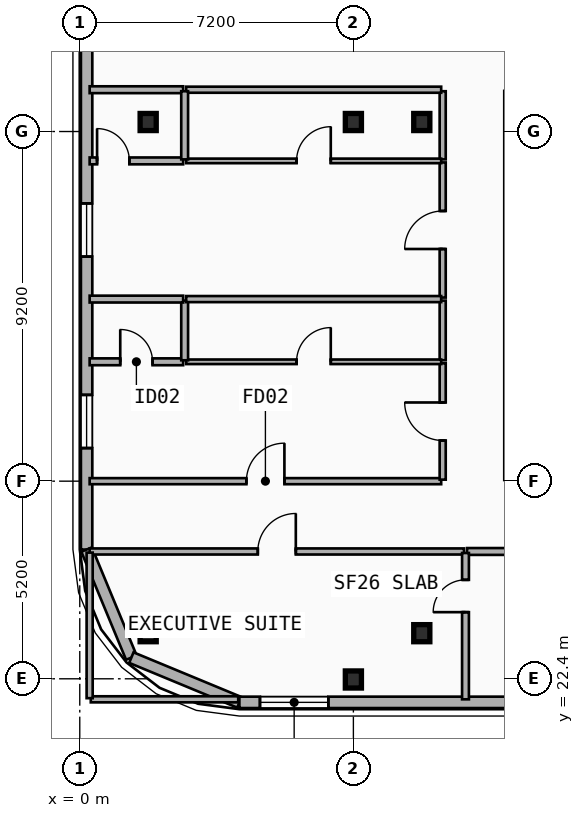
"""IFC4 building model, lengths in metres.
Left out: names, types, materials, properties, quantities, classifications, styles, units other than length and angle.
Written with IfcOpenShell. Run it as: python <this file> out.ifc"""

import sys

from ifc_helpers import new_model, si_unit, direction, frame, frame_2d, origin, origin_2d, place, context, subcontext, project, spatial, rectangle, i_section, extrude, element, fill, save


model = new_model("IFC4")
c1 = context("Model", 3, precision=1e-05, world=origin(), true_north=direction((0.0, 1.0)))
c2 = subcontext(c1, "Body", "Model", "MODEL_VIEW")
j1 = project(units=[si_unit("LENGTHUNIT", "METRE"), si_unit("PLANEANGLEUNIT", "RADIAN")], contexts=[c1])
p1 = place(None, origin())
s1 = spatial("IfcSite", under=j1, at=p1, CompositionType="ELEMENT")
p2 = place(p1, origin())
s2 = spatial("IfcBuilding", under=s1, at=p2, CompositionType="ELEMENT")
p3 = place(p2, frame((0.0, 0.0, 43.0)))
s3 = spatial("IfcBuildingStorey", under=s2, at=p3, CompositionType="ELEMENT", Elevation=43.0)
for number, where, z_axis, x_axis in (
    (1, (9.0, 23.6, 0.0), (0.0, 0.0, 1.0), (1.0, 0.0, 0.0)),
    (2, (9.0, 37.05, 0.0), (0.0, 0.0, 1.0), (1.0, 0.0, 0.0)),
    (3, (1.8, 23.6, 0.0), (0.0, 0.0, 1.0), (1.0, 0.0, 0.0)),
    (4, (1.8, 37.05, 0.0), (0.0, 0.0, 1.0), (1.0, 0.0, 0.0)),
):
    element("IfcColumn", number, at=place(p3, frame(where, z_axis=z_axis, x_axis=x_axis)), inside=s3, PredefinedType="COLUMN", context=c2, shape_type="SweptSolid", body=[
        extrude(i_section(OverallWidth=0.424, OverallDepth=0.45, WebThickness=0.041, FlangeThickness=0.065, FilletRadius=0.015, at=origin_2d()), origin(), (0.0, 0.0, 1.0), 3.5),
    ])
p4 = place(p3, frame((7.2, 22.478, 0.0), z_axis=(0.0, -0.079822602517, 0.996809085095), x_axis=(1.0, 0.0, 0.0)))
e5 = element("IfcColumn", 5, at=p4, inside=s3, PredefinedType="COLUMN", context=c2, shape_type="SweptSolid", body=[
    extrude(i_section(OverallWidth=0.424, OverallDepth=0.45, WebThickness=0.041, FlangeThickness=0.065, FilletRadius=0.015, at=origin_2d()), origin(), (0.0, 0.0, 1.0), 3.511),
])
p5 = place(p3, frame((7.2, 37.05, 0.0), z_axis=(0.0, 0.0, 1.0), x_axis=(1.0, 0.0, 0.0)))
e6 = element("IfcColumn", 6, at=p5, inside=s3, PredefinedType="COLUMN", context=c2, shape_type="SweptSolid", body=[
    extrude(i_section(OverallWidth=0.424, OverallDepth=0.45, WebThickness=0.041, FlangeThickness=0.065, FilletRadius=0.015, at=origin_2d()), origin(), (0.0, 0.0, 1.0), 3.5),
])
p6 = place(p3, frame((0.18, 25.8, 0.0), z_axis=(0.0, 0.0, 1.0), x_axis=(0.0, 1.0, 0.0)))
e7 = element("IfcWall", 7, at=p6, inside=s3, PredefinedType="SOLIDWALL", context=c2, shape_type="SweptSolid", body=[
    extrude(rectangle(XDim=15.2, YDim=0.3, at=frame_2d((7.6, 0.0))), origin(), (0.0, 0.0, 1.0), 3.24),
])
p7 = place(p6, frame((2.67, 0.0, 0.48)))
e8 = element("IfcOpeningElement", 8, at=p7, cuts=e7, PredefinedType="OPENING", context=c2, shape_type="SweptSolid", body=[
    extrude(rectangle(XDim=1.4, YDim=1.8, at=frame_2d((0.7, 0.9))), frame((0.0, 0.16, 0.0), z_axis=(0.0, -1.0, 0.0), x_axis=(1.0, 0.0, 0.0)), (0.0, 0.0, 1.0), 0.32),
])
p8 = place(p6, frame((7.709, 0.0, 0.48)))
e9 = element("IfcOpeningElement", 9, at=p8, cuts=e7, PredefinedType="OPENING", context=c2, shape_type="SweptSolid", body=[
    extrude(rectangle(XDim=1.4, YDim=1.8, at=frame_2d((0.7, 0.9))), frame((0.0, 0.16, 0.0), z_axis=(0.0, -1.0, 0.0), x_axis=(1.0, 0.0, 0.0)), (0.0, 0.0, 1.0), 0.32),
])
for number, where, z_axis, x_axis in (
    (10, (1.357, 22.958, 0.0), (0.0, 0.0, 1.0), (-0.383, 0.924, 0.0)),
    (11, (4.2, 21.78, 0.0), (0.0, 0.0, 1.0), (-0.924, 0.383, 0.0)),
):
    element("IfcWall", number, at=place(p3, frame(where, z_axis=z_axis, x_axis=x_axis)), inside=s3, PredefinedType="SOLIDWALL", context=c2, shape_type="SweptSolid", body=[
        extrude(rectangle(XDim=3.077, YDim=0.3, at=frame_2d((1.538, 0.0))), origin(), (0.0, 0.0, 1.0), 3.24),
    ])
p9 = place(p3, frame((53.4, 21.78, 0.0), z_axis=(0.0, 0.0, 1.0), x_axis=(-1.0, 0.0, 0.0)))
e12 = element("IfcWall", 12, at=p9, inside=s3, PredefinedType="SOLIDWALL", context=c2, shape_type="SweptSolid", body=[
    extrude(rectangle(XDim=49.2, YDim=0.3, at=frame_2d((24.6, 0.0))), origin(), (0.0, 0.0, 1.0), 2.82),
])
p10 = place(p9, frame((46.859, 0.0, 0.65)))
e13 = element("IfcOpeningElement", 13, at=p10, cuts=e12, PredefinedType="OPENING", context=c2, shape_type="SweptSolid", body=[
    extrude(rectangle(XDim=1.8, YDim=1.8, at=frame_2d((0.9, 0.9))), frame((0.0, 0.16, 0.0), z_axis=(0.0, -1.0, 0.0), x_axis=(1.0, 0.0, 0.0)), (0.0, 0.0, 1.0), 0.32),
])
p11 = place(p9, frame((37.75, 0.0, 0.52)))
e14 = element("IfcOpeningElement", 14, at=p11, cuts=e12, PredefinedType="OPENING", context=c2, shape_type="SweptSolid", body=[
    extrude(rectangle(XDim=1.1, YDim=1.05, at=frame_2d((0.55, 0.525))), frame((0.0, 0.16, 0.0), z_axis=(0.0, -1.0, 0.0), x_axis=(1.0, 0.0, 0.0)), (0.0, 0.0, 1.0), 0.32),
])
p12 = place(p9, frame((14.658, 0.0, 0.34)))
e15 = element("IfcOpeningElement", 15, at=p12, cuts=e12, PredefinedType="OPENING", context=c2, shape_type="SweptSolid", body=[
    extrude(rectangle(XDim=1.2, YDim=1.5, at=frame_2d((0.6, 0.75))), frame((0.0, 0.16, 0.0), z_axis=(0.0, -1.0, 0.0), x_axis=(1.0, 0.0, 0.0)), (0.0, 0.0, 1.0), 0.32),
])
p13 = place(p9, frame((4.223, 0.0, 0.65)))
e16 = element("IfcOpeningElement", 16, at=p13, cuts=e12, PredefinedType="OPENING", context=c2, shape_type="SweptSolid", body=[
    extrude(rectangle(XDim=1.8, YDim=1.8, at=frame_2d((0.9, 0.9))), frame((0.0, 0.16, 0.0), z_axis=(0.0, -1.0, 0.0), x_axis=(1.0, 0.0, 0.0)), (0.0, 0.0, 1.0), 0.32),
])
p14 = place(p3, frame((0.26, 27.6, 0.0), z_axis=(0.0, 0.0, 1.0), x_axis=(1.0, 0.0, 0.0)))
e17 = element("IfcWall", 17, at=p14, inside=s3, PredefinedType="PARTITIONING", context=c2, shape_type="SweptSolid", body=[
    extrude(rectangle(XDim=9.25, YDim=0.16, at=frame_2d((4.625, 0.0))), origin(), (0.0, 0.0, 1.0), 2.57),
])
p15 = place(p14, frame((4.125, 0.0, 0.0)))
e18 = element("IfcOpeningElement", 18, at=p15, cuts=e17, PredefinedType="OPENING", context=c2, shape_type="SweptSolid", body=[
    extrude(rectangle(XDim=1.0, YDim=2.15, at=frame_2d((0.5, 1.075))), frame((0.0, 0.09, 0.0), z_axis=(0.0, -1.0, 0.0), x_axis=(1.0, 0.0, 0.0)), (0.0, 0.0, 1.0), 0.18),
])
p16 = place(p3, frame((0.26, 25.75, 0.0), z_axis=(0.0, 0.0, 1.0), x_axis=(1.0, 0.0, 0.0)))
e19 = element("IfcWall", 19, at=p16, inside=s3, PredefinedType="PARTITIONING", context=c2, shape_type="SweptSolid", body=[
    extrude(rectangle(XDim=9.85, YDim=0.16, at=frame_2d((4.925, 0.0))), origin(), (0.0, 0.0, 1.0), 2.57),
])
p17 = place(p16, frame((4.425, 0.0, 0.0)))
e20 = element("IfcOpeningElement", 20, at=p17, cuts=e19, PredefinedType="OPENING", context=c2, shape_type="SweptSolid", body=[
    extrude(rectangle(XDim=1.0, YDim=2.15, at=frame_2d((0.5, 1.075))), frame((0.0, 0.09, 0.0), z_axis=(0.0, -1.0, 0.0), x_axis=(1.0, 0.0, 0.0)), (0.0, 0.0, 1.0), 0.18),
])
p18 = place(p3, frame((10.19, 25.75, 0.0), z_axis=(0.0, 0.0, 1.0), x_axis=(1.0, 0.0, 0.0)))
e21 = element("IfcWall", 21, at=p18, inside=s3, PredefinedType="PLUMBINGWALL", context=c2, shape_type="SweptSolid", body=[
    extrude(rectangle(XDim=1.97, YDim=0.18, at=frame_2d((0.985, 0.0))), origin(), (0.0, 0.0, 1.0), 2.28),
])
p19 = place(p3, frame((9.55, 27.64, 0.0), z_axis=(0.0, 0.0, 1.0), x_axis=(0.0, 1.0, 0.0)))
e22 = element("IfcWall", 22, at=p19, inside=s3, PredefinedType="PARTITIONING", context=c2, shape_type="SweptSolid", body=[
    extrude(rectangle(XDim=3.061, YDim=0.16, at=frame_2d((1.531, 0.0))), origin(), (0.0, 0.0, 1.0), 3.24),
])
p20 = place(p19, frame((1.031, 0.0, 0.0)))
e23 = element("IfcOpeningElement", 23, at=p20, cuts=e22, PredefinedType="OPENING", context=c2, shape_type="SweptSolid", body=[
    extrude(rectangle(XDim=1.0, YDim=2.15, at=frame_2d((0.5, 1.075))), frame((0.0, 0.09, 0.0), z_axis=(0.0, -1.0, 0.0), x_axis=(1.0, 0.0, 0.0)), (0.0, 0.0, 1.0), 0.18),
])
p21 = place(p3, frame((9.55, 30.781, 0.0), z_axis=(0.0, 0.0, 1.0), x_axis=(0.0, 1.0, 0.0)))
e24 = element("IfcWall", 24, at=p21, inside=s3, PredefinedType="PARTITIONING", context=c2, shape_type="SweptSolid", body=[
    extrude(rectangle(XDim=1.57, YDim=0.16, at=frame_2d((0.785, 0.0))), origin(), (0.0, 0.0, 1.0), 3.24),
])
p22 = place(p3, frame((9.55, 32.431, 0.0), z_axis=(0.0, 0.0, 1.0), x_axis=(0.0, 1.0, 0.0)))
e25 = element("IfcWall", 25, at=p22, inside=s3, PredefinedType="PARTITIONING", context=c2, shape_type="SweptSolid", body=[
    extrude(rectangle(XDim=3.556, YDim=0.16, at=frame_2d((1.778, 0.0))), origin(), (0.0, 0.0, 1.0), 3.24),
])
p23 = place(p22, frame((1.278, 0.0, 0.0)))
e26 = element("IfcOpeningElement", 26, at=p23, cuts=e25, PredefinedType="OPENING", context=c2, shape_type="SweptSolid", body=[
    extrude(rectangle(XDim=1.0, YDim=2.15, at=frame_2d((0.5, 1.075))), frame((0.0, 0.09, 0.0), z_axis=(0.0, -1.0, 0.0), x_axis=(1.0, 0.0, 0.0)), (0.0, 0.0, 1.0), 0.18),
])
p24 = place(p3, frame((9.55, 36.067, 0.0), z_axis=(0.0, 0.0, 1.0), x_axis=(0.0, 1.0, 0.0)))
e27 = element("IfcWall", 27, at=p24, inside=s3, PredefinedType="PARTITIONING", context=c2, shape_type="SweptSolid", body=[
    extrude(rectangle(XDim=1.793, YDim=0.16, at=frame_2d((0.896, 0.0))), origin(), (0.0, 0.0, 1.0), 2.72),
])
p25 = place(p3, frame((0.26, 37.9, 0.0), z_axis=(0.0, 0.0, 1.0), x_axis=(1.0, 0.0, 0.0)))
e28 = element("IfcWall", 28, at=p25, inside=s3, PredefinedType="PLUMBINGWALL", context=c2, shape_type="SweptSolid", body=[
    extrude(rectangle(XDim=2.46, YDim=0.18, at=frame_2d((1.23, 0.0))), origin(), (0.0, 0.0, 1.0), 3.24),
])
p26 = place(p3, frame((2.8, 37.9, 0.0), z_axis=(0.0, 0.0, 1.0), x_axis=(1.0, 0.0, 0.0)))
e29 = element("IfcWall", 29, at=p26, inside=s3, PredefinedType="PARTITIONING", context=c2, shape_type="SweptSolid", body=[
    extrude(rectangle(XDim=6.71, YDim=0.16, at=frame_2d((3.355, 0.0))), origin(), (0.0, 0.0, 1.0), 3.24),
])
p27 = place(p3, frame((0.26, 30.741, 0.0), z_axis=(0.0, 0.0, 1.0), x_axis=(1.0, 0.0, 0.0)))
e30 = element("IfcWall", 30, at=p27, inside=s3, PredefinedType="PLUMBINGWALL", context=c2, shape_type="SweptSolid", body=[
    extrude(rectangle(XDim=2.46, YDim=0.18, at=frame_2d((1.23, 0.0))), origin(), (0.0, 0.0, 1.0), 2.57),
])
p28 = place(p27, frame((0.805, 0.0, 0.0)))
e31 = element("IfcOpeningElement", 31, at=p28, cuts=e30, PredefinedType="OPENING", context=c2, shape_type="SweptSolid", body=[
    extrude(rectangle(XDim=0.85, YDim=2.1, at=frame_2d((0.425, 1.05))), frame((0.0, 0.1, 0.0), z_axis=(0.0, -1.0, 0.0), x_axis=(1.0, 0.0, 0.0)), (0.0, 0.0, 1.0), 0.2),
])
p29 = place(p3, frame((2.8, 30.741, 0.0), z_axis=(0.0, 0.0, 1.0), x_axis=(1.0, 0.0, 0.0)))
e32 = element("IfcWall", 32, at=p29, inside=s3, PredefinedType="PARTITIONING", context=c2, shape_type="SweptSolid", body=[
    extrude(rectangle(XDim=6.71, YDim=0.12, at=frame_2d((3.355, 0.0))), origin(), (0.0, 0.0, 1.0), 2.57),
])
p30 = place(p29, frame((2.905, 0.0, 0.0)))
e33 = element("IfcOpeningElement", 33, at=p30, cuts=e32, PredefinedType="OPENING", context=c2, shape_type="SweptSolid", body=[
    extrude(rectangle(XDim=0.9, YDim=2.1, at=frame_2d((0.45, 1.05))), frame((0.0, 0.07, 0.0), z_axis=(0.0, -1.0, 0.0), x_axis=(1.0, 0.0, 0.0)), (0.0, 0.0, 1.0), 0.14),
])
p31 = place(p3, frame((2.76, 30.781, 0.0), z_axis=(0.0, 0.0, 1.0), x_axis=(0.0, 1.0, 0.0)))
e34 = element("IfcWall", 34, at=p31, inside=s3, PredefinedType="PLUMBINGWALL", context=c2, shape_type="SweptSolid", body=[
    extrude(rectangle(XDim=1.57, YDim=0.18, at=frame_2d((0.785, 0.0))), origin(), (0.0, 0.0, 1.0), 3.24),
])
p32 = place(p3, frame((0.26, 32.391, 0.0), z_axis=(0.0, 0.0, 1.0), x_axis=(1.0, 0.0, 0.0)))
e35 = element("IfcWall", 35, at=p32, inside=s3, PredefinedType="PLUMBINGWALL", context=c2, shape_type="SweptSolid", body=[
    extrude(rectangle(XDim=2.46, YDim=0.18, at=frame_2d((1.23, 0.0))), origin(), (0.0, 0.0, 1.0), 2.57),
])
p33 = place(p3, frame((2.8, 32.391, 0.0), z_axis=(0.0, 0.0, 1.0), x_axis=(1.0, 0.0, 0.0)))
e36 = element("IfcWall", 36, at=p33, inside=s3, PredefinedType="PARTITIONING", context=c2, shape_type="SweptSolid", body=[
    extrude(rectangle(XDim=6.71, YDim=0.16, at=frame_2d((3.355, 0.0))), origin(), (0.0, 0.0, 1.0), 2.57),
])
p34 = place(p3, frame((0.26, 36.027, 0.0), z_axis=(0.0, 0.0, 1.0), x_axis=(1.0, 0.0, 0.0)))
e37 = element("IfcWall", 37, at=p34, inside=s3, PredefinedType="PLUMBINGWALL", context=c2, shape_type="SweptSolid", body=[
    extrude(rectangle(XDim=2.46, YDim=0.18, at=frame_2d((1.23, 0.0))), origin(), (0.0, 0.0, 1.0), 2.57),
])
p35 = place(p34, frame((0.195, 0.0, 0.0)))
e38 = element("IfcOpeningElement", 38, at=p35, cuts=e37, PredefinedType="OPENING", context=c2, shape_type="SweptSolid", body=[
    extrude(rectangle(XDim=0.85, YDim=2.1, at=frame_2d((0.425, 1.05))), frame((0.0, 0.1, 0.0), z_axis=(0.0, -1.0, 0.0), x_axis=(1.0, 0.0, 0.0)), (0.0, 0.0, 1.0), 0.2),
])
p36 = place(p3, frame((2.8, 36.027, 0.0), z_axis=(0.0, 0.0, 1.0), x_axis=(1.0, 0.0, 0.0)))
e39 = element("IfcWall", 39, at=p36, inside=s3, PredefinedType="PARTITIONING", context=c2, shape_type="SweptSolid", body=[
    extrude(rectangle(XDim=6.71, YDim=0.12, at=frame_2d((3.355, 0.0))), origin(), (0.0, 0.0, 1.0), 2.57),
])
p37 = place(p36, frame((2.905, 0.0, 0.0)))
e40 = element("IfcOpeningElement", 40, at=p37, cuts=e39, PredefinedType="OPENING", context=c2, shape_type="SweptSolid", body=[
    extrude(rectangle(XDim=0.9, YDim=2.1, at=frame_2d((0.45, 1.05))), frame((0.0, 0.07, 0.0), z_axis=(0.0, -1.0, 0.0), x_axis=(1.0, 0.0, 0.0)), (0.0, 0.0, 1.0), 0.14),
])
p38 = place(p3, frame((2.76, 36.067, 0.0), z_axis=(0.0, 0.0, 1.0), x_axis=(0.0, 1.0, 0.0)))
e41 = element("IfcWall", 41, at=p38, inside=s3, PredefinedType="PLUMBINGWALL", context=c2, shape_type="SweptSolid", body=[
    extrude(rectangle(XDim=1.793, YDim=0.18, at=frame_2d((0.896, 0.0))), origin(), (0.0, 0.0, 1.0), 2.72),
])
p39 = place(p3, frame((10.15, 21.86, 0.0), z_axis=(0.0, 0.0, 1.0), x_axis=(0.0, 1.0, 0.0)))
e42 = element("IfcWall", 42, at=p39, inside=s3, PredefinedType="PLUMBINGWALL", context=c2, shape_type="SweptSolid", body=[
    extrude(rectangle(XDim=3.85, YDim=0.18, at=frame_2d((1.925, 0.0))), origin(), (0.0, 0.0, 1.0), 2.72),
])
p40 = place(p39, frame((2.293, 0.0, 0.0)))
e43 = element("IfcOpeningElement", 43, at=p40, cuts=e42, PredefinedType="OPENING", context=c2, shape_type="SweptSolid", body=[
    extrude(rectangle(XDim=0.85, YDim=2.1, at=frame_2d((0.425, 1.05))), frame((0.0, 0.1, 0.0), z_axis=(0.0, -1.0, 0.0), x_axis=(1.0, 0.0, 0.0)), (0.0, 0.0, 1.0), 0.2),
])
p41 = place(p3, frame((0.29, 21.86, 0.0), z_axis=(0.0, 0.0, 1.0), x_axis=(1.0, 0.0, 0.0)))
e44 = element("IfcWall", 44, at=p41, inside=s3, PredefinedType="PARTITIONING", context=c2, shape_type="SweptSolid", body=[
    extrude(rectangle(XDim=3.88, YDim=0.16, at=frame_2d((1.94, 0.0))), origin(), (0.0, 0.0, 1.0), 2.72),
])
p42 = place(p3, frame((0.26, 21.89, 0.0), z_axis=(0.0, 0.0, 1.0), x_axis=(0.0, 1.0, 0.0)))
e45 = element("IfcWall", 45, at=p42, inside=s3, PredefinedType="PARTITIONING", context=c2, shape_type="SweptSolid", body=[
    extrude(rectangle(XDim=3.83, YDim=0.16, at=frame_2d((1.915, 0.0))), origin(), (0.0, 0.0, 1.0), 3.24),
])
p43 = place(p7, origin())
e46 = element("IfcWindow", 46, at=p43, inside=s3, PartitioningType="SINGLE_PANEL", PredefinedType="WINDOW", context=c2, shape_type="SweptSolid", body=[
    extrude(rectangle(XDim=1.4, YDim=1.8, at=frame_2d((0.7, 0.9))), frame((0.0, 0.03, 0.0), z_axis=(0.0, -1.0, 0.0), x_axis=(1.0, 0.0, 0.0)), (0.0, 0.0, 1.0), 0.06),
])
fill(e8, e46)
p44 = place(p8, origin())
e47 = element("IfcWindow", 47, at=p44, inside=s3, PartitioningType="SINGLE_PANEL", PredefinedType="WINDOW", context=c2, shape_type="SweptSolid", body=[
    extrude(rectangle(XDim=1.4, YDim=1.8, at=frame_2d((0.7, 0.9))), frame((0.0, 0.03, 0.0), z_axis=(0.0, -1.0, 0.0), x_axis=(1.0, 0.0, 0.0)), (0.0, 0.0, 1.0), 0.06),
])
fill(e9, e47)
p45 = place(p10, origin())
e48 = element("IfcWindow", 48, at=p45, inside=s3, PartitioningType="SINGLE_PANEL", PredefinedType="WINDOW", context=c2, shape_type="SweptSolid", body=[
    extrude(rectangle(XDim=1.8, YDim=1.8, at=frame_2d((0.9, 0.9))), frame((0.0, 0.03, 0.0), z_axis=(0.0, -1.0, 0.0), x_axis=(1.0, 0.0, 0.0)), (0.0, 0.0, 1.0), 0.06),
])
fill(e13, e48)
p46 = place(p15, origin())
e49 = element("IfcDoor", 49, at=p46, inside=s3, OperationType="SINGLE_SWING_RIGHT", PredefinedType="DOOR", context=c2, shape_type="SweptSolid", body=[
    extrude(rectangle(XDim=1.0, YDim=2.15, at=frame_2d((0.5, 1.075))), frame((0.0, 0.025, 0.0), z_axis=(0.0, -1.0, 0.0), x_axis=(1.0, 0.0, 0.0)), (0.0, 0.0, 1.0), 0.05),
])
fill(e18, e49)
p47 = place(p17, origin())
e50 = element("IfcDoor", 50, at=p47, inside=s3, OperationType="SINGLE_SWING_RIGHT", PredefinedType="DOOR", context=c2, shape_type="SweptSolid", body=[
    extrude(rectangle(XDim=1.0, YDim=2.15, at=frame_2d((0.5, 1.075))), frame((0.0, 0.025, 0.0), z_axis=(0.0, -1.0, 0.0), x_axis=(1.0, 0.0, 0.0)), (0.0, 0.0, 1.0), 0.05),
])
fill(e20, e50)
p48 = place(p20, origin())
e51 = element("IfcDoor", 51, at=p48, inside=s3, OperationType="SINGLE_SWING_RIGHT", PredefinedType="DOOR", context=c2, shape_type="SweptSolid", body=[
    extrude(rectangle(XDim=1.0, YDim=2.15, at=frame_2d((0.5, 1.075))), frame((0.0, 0.025, 0.0), z_axis=(0.0, -1.0, 0.0), x_axis=(1.0, 0.0, 0.0)), (0.0, 0.0, 1.0), 0.05),
])
fill(e23, e51)
p49 = place(p23, origin())
e52 = element("IfcDoor", 52, at=p49, inside=s3, OperationType="SINGLE_SWING_LEFT", PredefinedType="DOOR", context=c2, shape_type="SweptSolid", body=[
    extrude(rectangle(XDim=1.0, YDim=2.15, at=frame_2d((0.5, 1.075))), frame((0.0, 0.025, 0.0), z_axis=(0.0, -1.0, 0.0), x_axis=(1.0, 0.0, 0.0)), (0.0, 0.0, 1.0), 0.05),
])
fill(e26, e52)
p50 = place(p28, origin())
e53 = element("IfcDoor", 53, at=p50, inside=s3, OperationType="SINGLE_SWING_LEFT", PredefinedType="DOOR", context=c2, shape_type="SweptSolid", body=[
    extrude(rectangle(XDim=0.85, YDim=2.1, at=frame_2d((0.425, 1.05))), frame((0.0, 0.025, 0.0), z_axis=(0.0, -1.0, 0.0), x_axis=(1.0, 0.0, 0.0)), (0.0, 0.0, 1.0), 0.05),
])
fill(e31, e53)
p51 = place(p30, origin())
e54 = element("IfcDoor", 54, at=p51, inside=s3, OperationType="SINGLE_SWING_RIGHT", PredefinedType="DOOR", context=c2, shape_type="SweptSolid", body=[
    extrude(rectangle(XDim=0.9, YDim=2.1, at=frame_2d((0.45, 1.05))), frame((0.0, 0.025, 0.0), z_axis=(0.0, -1.0, 0.0), x_axis=(1.0, 0.0, 0.0)), (0.0, 0.0, 1.0), 0.05),
])
fill(e33, e54)
p52 = place(p35, origin())
e55 = element("IfcDoor", 55, at=p52, inside=s3, OperationType="SINGLE_SWING_LEFT", PredefinedType="DOOR", context=c2, shape_type="SweptSolid", body=[
    extrude(rectangle(XDim=0.85, YDim=2.1, at=frame_2d((0.425, 1.05))), frame((0.0, 0.025, 0.0), z_axis=(0.0, -1.0, 0.0), x_axis=(1.0, 0.0, 0.0)), (0.0, 0.0, 1.0), 0.05),
])
fill(e38, e55)
p53 = place(p37, origin())
e56 = element("IfcDoor", 56, at=p53, inside=s3, OperationType="SINGLE_SWING_RIGHT", PredefinedType="DOOR", context=c2, shape_type="SweptSolid", body=[
    extrude(rectangle(XDim=0.9, YDim=2.1, at=frame_2d((0.45, 1.05))), frame((0.0, 0.025, 0.0), z_axis=(0.0, -1.0, 0.0), x_axis=(1.0, 0.0, 0.0)), (0.0, 0.0, 1.0), 0.05),
])
fill(e40, e56)
p54 = place(p40, origin())
e57 = element("IfcDoor", 57, at=p54, inside=s3, OperationType="SINGLE_SWING_LEFT", PredefinedType="DOOR", context=c2, shape_type="SweptSolid", body=[
    extrude(rectangle(XDim=0.85, YDim=2.1, at=frame_2d((0.425, 1.05))), frame((0.0, 0.025, 0.0), z_axis=(0.0, -1.0, 0.0), x_axis=(1.0, 0.0, 0.0)), (0.0, 0.0, 1.0), 0.05),
])
fill(e43, e57)
save(model, sys.argv[1])
